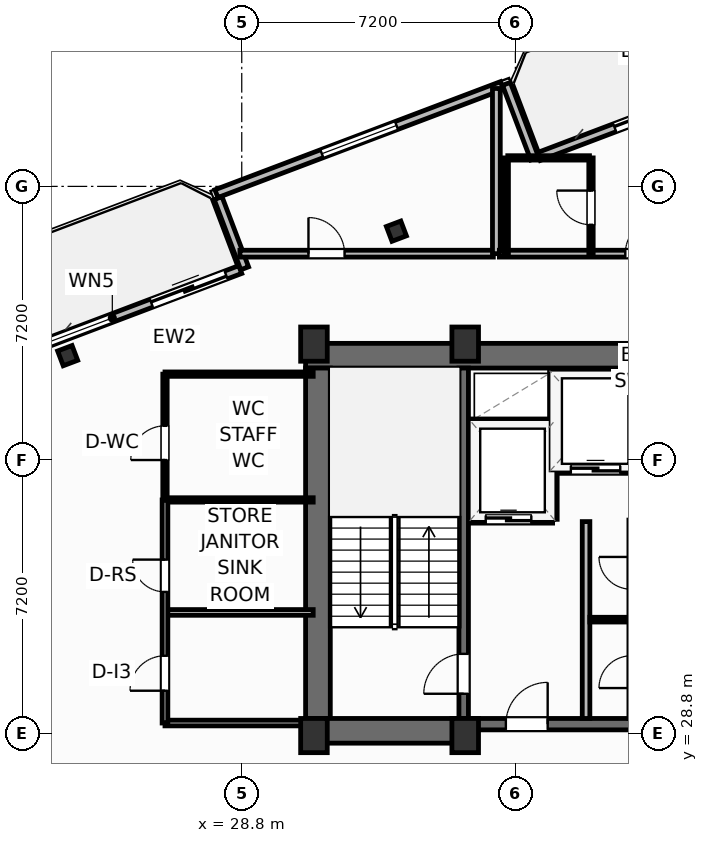
"""IFC4 building model, lengths in metres.
Left out: names, types, materials, properties, quantities, classifications, styles, units other than length and angle.
Written with IfcOpenShell. Run it as: python <this file> out.ifc"""

import sys

from ifc_helpers import new_model, si_unit, direction, frame, frame_2d, origin, origin_2d, place, context, subcontext, project, spatial, rectangle, i_section, extrude, element, fill, save


model = new_model("IFC4")
c1 = context("Model", 3, precision=1e-05, world=origin(), true_north=direction((0.0, 1.0)))
c2 = subcontext(c1, "Body", "Model", "MODEL_VIEW")
j1 = project(units=[si_unit("LENGTHUNIT", "METRE"), si_unit("PLANEANGLEUNIT", "RADIAN")], contexts=[c1])
p1 = place(None, origin())
s1 = spatial("IfcSite", under=j1, at=p1, CompositionType="ELEMENT")
p2 = place(p1, origin())
s2 = spatial("IfcBuilding", under=s1, at=p2, CompositionType="ELEMENT")
p3 = place(p2, frame((0.0, 0.0, 220.1)))
s3 = spatial("IfcBuildingStorey", under=s2, at=p3, CompositionType="ELEMENT", Elevation=220.1)
for number, where, z_axis, x_axis in (
    (1, (30.7, 28.75, 0.0), (0.0, 0.0, 1.0), (1.0, 0.0, 0.0)),
    (2, (34.68, 28.75, 0.0), (0.0, 0.0, 1.0), (1.0, 0.0, 0.0)),
    (3, (30.7, 39.05, 0.0), (0.0, 0.0, 1.0), (1.0, 0.0, 0.0)),
    (4, (34.68, 39.05, 0.0), (0.0, 0.0, 1.0), (1.0, 0.0, 0.0)),
):
    element("IfcColumn", number, at=place(p3, frame(where, z_axis=z_axis, x_axis=x_axis)), inside=s3, PredefinedType="COLUMN", context=c2, shape_type="SweptSolid", body=[
        extrude(rectangle(XDim=0.7, YDim=0.9, at=origin_2d()), origin(), (0.0, 0.0, 1.0), 3.7),
    ])
p4 = place(p3, frame((30.48, 38.745, 0.0), z_axis=(0.0, 0.0, 1.0), x_axis=(1.0, 0.0, 0.0)))
e5 = element("IfcWall", 5, at=p4, inside=s3, PredefinedType="SHEAR", context=c2, shape_type="SweptSolid", body=[
    extrude(rectangle(XDim=17.44, YDim=0.65, at=frame_2d((8.72, 0.0))), origin(), (0.0, 0.0, 1.0), 3.45),
])
p5 = place(p3, frame((30.805, 29.2, 0.0), z_axis=(0.0, 0.0, 1.0), x_axis=(0.0, 1.0, 0.0)))
e6 = element("IfcWall", 6, at=p5, inside=s3, PredefinedType="SHEAR", context=c2, shape_type="SweptSolid", body=[
    extrude(rectangle(XDim=9.22, YDim=0.65, at=frame_2d((4.61, 0.0))), origin(), (0.0, 0.0, 1.0), 3.45),
])
p6 = place(p3, frame((30.48, 28.875, 0.0), z_axis=(0.0, 0.0, 1.0), x_axis=(1.0, 0.0, 0.0)))
e7 = element("IfcWall", 7, at=p6, inside=s3, PredefinedType="SHEAR", context=c2, shape_type="SweptSolid", body=[
    extrude(rectangle(XDim=4.32, YDim=0.65, at=frame_2d((2.16, 0.0))), origin(), (0.0, 0.0, 1.0), 3.45),
])
p7 = place(p3, frame((34.8, 29.05, 0.0), z_axis=(0.0, 0.0, 1.0), x_axis=(1.0, 0.0, 0.0)))
e8 = element("IfcWall", 8, at=p7, inside=s3, PredefinedType="SHEAR", context=c2, shape_type="SweptSolid", body=[
    extrude(rectangle(XDim=8.8, YDim=0.3, at=frame_2d((4.4, 0.0))), origin(), (0.0, 0.0, 1.0), 3.45),
])
p8 = place(p7, frame((0.95, 0.0, 0.0)))
e9 = element("IfcOpeningElement", 9, at=p8, cuts=e8, PredefinedType="OPENING", context=c2, shape_type="SweptSolid", body=[
    extrude(rectangle(XDim=1.1, YDim=2.15, at=frame_2d((0.55, 1.075))), frame((0.0, 0.16, 0.0), z_axis=(0.0, -1.0, 0.0), x_axis=(1.0, 0.0, 0.0)), (0.0, 0.0, 1.0), 0.32),
])
p9 = place(p7, frame((6.75, 0.0, 0.0)))
e10 = element("IfcOpeningElement", 10, at=p9, cuts=e8, PredefinedType="OPENING", context=c2, shape_type="SweptSolid", body=[
    extrude(rectangle(XDim=1.1, YDim=2.15, at=frame_2d((0.55, 1.075))), frame((0.0, 0.16, 0.0), z_axis=(0.0, -1.0, 0.0), x_axis=(1.0, 0.0, 0.0)), (0.0, 0.0, 1.0), 0.32),
])
p10 = place(p7, frame((4.45, 0.0, 0.0)))
e11 = element("IfcOpeningElement", 11, at=p10, cuts=e8, PredefinedType="OPENING", context=c2, shape_type="SweptSolid", body=[
    extrude(rectangle(XDim=0.95, YDim=2.15, at=frame_2d((0.475, 1.075))), frame((0.0, 0.16, 0.0), z_axis=(0.0, -1.0, 0.0), x_axis=(1.0, 0.0, 0.0)), (0.0, 0.0, 1.0), 0.32),
])
p11 = place(p3, frame((34.64, 29.2, 0.0), z_axis=(0.0, 0.0, 1.0), x_axis=(0.0, 1.0, 0.0)))
e12 = element("IfcWall", 12, at=p11, inside=s3, PredefinedType="SHEAR", context=c2, shape_type="SweptSolid", body=[
    extrude(rectangle(XDim=9.22, YDim=0.25, at=frame_2d((4.61, 0.0))), origin(), (0.0, 0.0, 1.0), 3.45),
])
p12 = place(p11, frame((0.65, 0.0, 0.0)))
e13 = element("IfcOpeningElement", 13, at=p12, cuts=e12, PredefinedType="OPENING", context=c2, shape_type="SweptSolid", body=[
    extrude(rectangle(XDim=1.05, YDim=2.15, at=frame_2d((0.525, 1.075))), frame((0.0, 0.135, 0.0), z_axis=(0.0, -1.0, 0.0), x_axis=(1.0, 0.0, 0.0)), (0.0, 0.0, 1.0), 0.27),
])
for number, where, z_axis, x_axis in (
    (14, (32.869, 42.022, 0.0), (0.0, 0.0, 1.0), (0.935, 0.354, 0.0)),
    (15, (24.219, 38.747, 0.0), (0.0, 0.0, 1.0), (0.935, 0.354, 0.0)),
):
    element("IfcColumn", number, at=place(p3, frame(where, z_axis=z_axis, x_axis=x_axis)), inside=s3, PredefinedType="COLUMN", context=c2, shape_type="SweptSolid", body=[
        extrude(i_section(OverallWidth=0.406, OverallDepth=0.416, WebThickness=0.03, FlangeThickness=0.048, FilletRadius=0.025, at=origin_2d()), origin(), (0.0, 0.0, 1.0), 3.7),
    ])
p13 = place(p3, frame((23.149, 38.887, 0.0), z_axis=(0.0, 0.0, 1.0), x_axis=(0.9352192676, 0.354069091436, 0.0)))
e16 = element("IfcWall", 16, at=p13, inside=s3, PredefinedType="SOLIDWALL", context=c2, shape_type="SweptSolid", body=[
    extrude(rectangle(XDim=6.0, YDim=0.22, at=frame_2d((3.0, 0.0))), origin(), (0.0, 0.0, 1.0), 2.73),
])
p14 = place(p13, frame((3.5, 0.0, 0.0)))
e17 = element("IfcOpeningElement", 17, at=p14, cuts=e16, PredefinedType="OPENING", context=c2, shape_type="SweptSolid", body=[
    extrude(rectangle(XDim=2.1, YDim=2.3, at=frame_2d((1.05, 1.15))), frame((0.0, 0.12, 0.0), z_axis=(0.0, -1.0, 0.0), x_axis=(1.0, 0.0, 0.0)), (0.0, 0.0, 1.0), 0.24),
])
p15 = place(p13, frame((0.55, 0.0, 0.75)))
e18 = element("IfcOpeningElement", 18, at=p15, cuts=e16, PredefinedType="OPENING", context=c2, shape_type="SweptSolid", body=[
    extrude(rectangle(XDim=1.85, YDim=1.75, at=frame_2d((0.925, 0.875))), frame((0.0, 0.12, 0.0), z_axis=(0.0, -1.0, 0.0), x_axis=(1.0, 0.0, 0.0)), (0.0, 0.0, 1.0), 0.24),
])
p16 = place(p3, frame((36.617, 43.986, 0.0), z_axis=(0.0, 0.0, 1.0), x_axis=(0.935227640088, 0.354046976001, 0.0)))
e19 = element("IfcWall", 19, at=p16, inside=s3, PredefinedType="SOLIDWALL", context=c2, shape_type="SweptSolid", body=[
    extrude(rectangle(XDim=6.0, YDim=0.22, at=frame_2d((3.0, 0.0))), origin(), (0.0, 0.0, 1.0), 2.73),
])
p17 = place(p16, frame((2.136, 0.0, 0.0)))
e20 = element("IfcOpeningElement", 20, at=p17, cuts=e19, PredefinedType="OPENING", context=c2, shape_type="SweptSolid", body=[
    extrude(rectangle(XDim=2.1, YDim=2.3, at=frame_2d((1.05, 1.15))), frame((0.0, 0.12, 0.0), z_axis=(0.0, -1.0, 0.0), x_axis=(1.0, 0.0, 0.0)), (0.0, 0.0, 1.0), 0.24),
])
p18 = place(p3, frame((36.508, 43.934, 0.0), z_axis=(0.0, 0.0, 1.0), x_axis=(-0.354128469405, 0.935196785258, 0.0)))
e21 = element("IfcWall", 21, at=p18, inside=s3, PredefinedType="SOLIDWALL", context=c2, shape_type="SweptSolid", body=[
    extrude(rectangle(XDim=2.1, YDim=0.22, at=frame_2d((1.05, 0.0))), origin(), (0.0, 0.0, 1.0), 2.73),
])
p19 = place(p3, frame((35.648, 45.854, 0.0), z_axis=(0.0, 0.0, 1.0), x_axis=(-0.935230796934, -0.354038636968, 0.0)))
e22 = element("IfcWall", 22, at=p19, inside=s3, PredefinedType="SOLIDWALL", context=c2, shape_type="SweptSolid", body=[
    extrude(rectangle(XDim=8.035, YDim=0.22, at=frame_2d((4.018, 0.0))), origin(), (0.0, 0.0, 1.0), 2.73),
])
p20 = place(p19, frame((2.968, 0.0, 0.8)))
e23 = element("IfcOpeningElement", 23, at=p20, cuts=e22, PredefinedType="OPENING", context=c2, shape_type="SweptSolid", body=[
    extrude(rectangle(XDim=2.1, YDim=1.75, at=frame_2d((1.05, 0.875))), frame((0.0, 0.12, 0.0), z_axis=(0.0, -1.0, 0.0), x_axis=(1.0, 0.0, 0.0)), (0.0, 0.0, 1.0), 0.24),
])
p21 = place(p3, frame((28.177, 42.892, 0.0), z_axis=(0.0, 0.0, 1.0), x_axis=(0.354061611705, -0.935222099352, 0.0)))
e24 = element("IfcWall", 24, at=p21, inside=s3, PredefinedType="SOLIDWALL", context=c2, shape_type="SweptSolid", body=[
    extrude(rectangle(XDim=1.975, YDim=0.22, at=frame_2d((0.987, 0.0))), origin(), (0.0, 0.0, 1.0), 2.73),
])
p22 = place(p3, frame((28.752, 41.43, 0.0), z_axis=(0.0, 0.0, 1.0), x_axis=(1.0, 0.0, 0.0)))
e25 = element("IfcWall", 25, at=p22, inside=s3, PredefinedType="PARTITIONING", context=c2, shape_type="SweptSolid", body=[
    extrude(rectangle(XDim=6.668, YDim=0.18, at=frame_2d((3.334, 0.0))), origin(), (0.0, 0.0, 1.0), 3.45),
])
p23 = place(p22, frame((1.803, 0.0, 0.0)))
e26 = element("IfcOpeningElement", 26, at=p23, cuts=e25, PredefinedType="OPENING", context=c2, shape_type="SweptSolid", body=[
    extrude(rectangle(XDim=0.95, YDim=2.05, at=frame_2d((0.475, 1.025))), frame((0.0, 0.1, 0.0), z_axis=(0.0, -1.0, 0.0), x_axis=(1.0, 0.0, 0.0)), (0.0, 0.0, 1.0), 0.2),
])
p24 = place(p3, frame((35.5, 41.43, 0.0), z_axis=(0.0, 0.0, 1.0), x_axis=(0.0, 1.0, 0.0)))
e27 = element("IfcWall", 27, at=p24, inside=s3, PredefinedType="PARTITIONING", context=c2, shape_type="SweptSolid", body=[
    extrude(rectangle(XDim=4.346, YDim=0.205, at=frame_2d((2.173, 0.0))), origin(), (0.0, 0.0, 1.0), 3.45),
])
p25 = place(p3, frame((35.58, 41.43, 0.0), z_axis=(0.0, 0.0, 1.0), x_axis=(1.0, 0.0, 0.0)))
e28 = element("IfcWall", 28, at=p25, inside=s3, PredefinedType="PARTITIONING", context=c2, shape_type="SweptSolid", body=[
    extrude(rectangle(XDim=11.34, YDim=0.18, at=frame_2d((5.67, 0.0))), origin(), (0.0, 0.0, 1.0), 3.018),
])
p26 = place(p25, frame((3.313, 0.0, 0.0)))
e29 = element("IfcOpeningElement", 29, at=p26, cuts=e28, PredefinedType="OPENING", context=c2, shape_type="SweptSolid", body=[
    extrude(rectangle(XDim=0.95, YDim=2.15, at=frame_2d((0.475, 1.075))), frame((0.0, 0.1, 0.0), z_axis=(0.0, -1.0, 0.0), x_axis=(1.0, 0.0, 0.0)), (0.0, 0.0, 1.0), 0.2),
])
p27 = place(p3, frame((35.8, 43.95, 0.0), z_axis=(0.0, 0.0, 1.0), x_axis=(1.0, 0.0, 0.0)))
e30 = element("IfcWall", 30, at=p27, inside=s3, PredefinedType="PARTITIONING", context=c2, shape_type="SweptSolid", body=[
    extrude(rectangle(XDim=2.15, YDim=0.115, at=frame_2d((1.075, 0.0))), origin(), (0.0, 0.0, 1.0), 3.45),
])
p28 = place(p3, frame((37.99, 41.43, 0.0), z_axis=(0.0, 0.0, 1.0), x_axis=(0.0, 1.0, 0.0)))
e31 = element("IfcWall", 31, at=p28, inside=s3, PredefinedType="PARTITIONING", context=c2, shape_type="SweptSolid", body=[
    extrude(rectangle(XDim=2.52, YDim=0.115, at=frame_2d((1.26, 0.0))), origin(), (0.0, 0.0, 1.0), 3.45),
])
p29 = place(p28, frame((0.76, 0.0, 0.0)))
e32 = element("IfcOpeningElement", 32, at=p29, cuts=e31, PredefinedType="OPENING", context=c2, shape_type="SweptSolid", body=[
    extrude(rectangle(XDim=0.9, YDim=2.05, at=frame_2d((0.45, 1.025))), frame((0.0, 0.067, 0.0), z_axis=(0.0, -1.0, 0.0), x_axis=(1.0, 0.0, 0.0)), (0.0, 0.0, 1.0), 0.135),
])
p30 = place(p3, frame((35.76, 41.43, 0.0), z_axis=(0.0, 0.0, 1.0), x_axis=(0.0, 1.0, 0.0)))
e33 = element("IfcWall", 33, at=p30, inside=s3, PredefinedType="PARTITIONING", context=c2, shape_type="SweptSolid", body=[
    extrude(rectangle(XDim=2.52, YDim=0.115, at=frame_2d((1.26, 0.0))), origin(), (0.0, 0.0, 1.0), 3.45),
])
p31 = place(p3, frame((37.86, 29.2, 0.0), z_axis=(0.0, 0.0, 1.0), x_axis=(0.0, 1.0, 0.0)))
e34 = element("IfcWall", 34, at=p31, inside=s3, PredefinedType="PARTITIONING", context=c2, shape_type="SweptSolid", body=[
    extrude(rectangle(XDim=5.18, YDim=0.2, at=frame_2d((2.59, 0.0))), origin(), (0.0, 0.0, 1.0), 3.45),
])
p32 = place(p3, frame((34.8, 34.44, 0.0), z_axis=(0.0, 0.0, 1.0), x_axis=(1.0, 0.0, 0.0)))
e35 = element("IfcWall", 35, at=p32, inside=s3, PredefinedType="PARTITIONING", context=c2, shape_type="SweptSolid", body=[
    extrude(rectangle(XDim=2.18, YDim=0.2, at=frame_2d((1.09, 0.0))), origin(), (0.0, 0.0, 1.0), 3.45),
])
p33 = place(p32, frame((0.42, 0.0, 0.0)))
e36 = element("IfcOpeningElement", 36, at=p33, cuts=e35, PredefinedType="OPENING", context=c2, shape_type="SweptSolid", body=[
    extrude(rectangle(XDim=1.2, YDim=2.2, at=frame_2d((0.6, 1.1))), frame((0.0, 0.11, 0.0), z_axis=(0.0, -1.0, 0.0), x_axis=(1.0, 0.0, 0.0)), (0.0, 0.0, 1.0), 0.22),
])
p34 = place(p3, frame((34.8, 36.98, 0.0), z_axis=(0.0, 0.0, 1.0), x_axis=(1.0, 0.0, 0.0)))
e37 = element("IfcWall", 37, at=p34, inside=s3, PredefinedType="PARTITIONING", context=c2, shape_type="SweptSolid", body=[
    extrude(rectangle(XDim=2.18, YDim=0.2, at=frame_2d((1.09, 0.0))), origin(), (0.0, 0.0, 1.0), 3.45),
])
p35 = place(p3, frame((37.0, 34.44, 0.0), z_axis=(0.0, 0.0, 1.0), x_axis=(0.0, 1.0, 0.0)))
e38 = element("IfcWall", 38, at=p35, inside=s3, PredefinedType="PARTITIONING", context=c2, shape_type="SweptSolid", body=[
    extrude(rectangle(XDim=3.9, YDim=0.2, at=frame_2d((1.95, 0.0))), origin(), (0.0, 0.0, 1.0), 3.45),
])
p36 = place(p3, frame((37.06, 35.75, 0.0), z_axis=(0.0, 0.0, 1.0), x_axis=(1.0, 0.0, 0.0)))
e39 = element("IfcWall", 39, at=p36, inside=s3, PredefinedType="PARTITIONING", context=c2, shape_type="SweptSolid", body=[
    extrude(rectangle(XDim=2.12, YDim=0.2, at=frame_2d((1.06, 0.0))), origin(), (0.0, 0.0, 1.0), 3.45),
])
p37 = place(p36, frame((0.4, 0.0, 0.0)))
e40 = element("IfcOpeningElement", 40, at=p37, cuts=e39, PredefinedType="OPENING", context=c2, shape_type="SweptSolid", body=[
    extrude(rectangle(XDim=1.3, YDim=2.2, at=frame_2d((0.65, 1.1))), frame((0.0, 0.11, 0.0), z_axis=(0.0, -1.0, 0.0), x_axis=(1.0, 0.0, 0.0)), (0.0, 0.0, 1.0), 0.22),
])
p38 = place(p3, frame((37.96, 31.8, 0.0), z_axis=(0.0, 0.0, 1.0), x_axis=(1.0, 0.0, 0.0)))
e41 = element("IfcWall", 41, at=p38, inside=s3, PredefinedType="PARTITIONING", context=c2, shape_type="SweptSolid", body=[
    extrude(rectangle(XDim=1.09, YDim=0.125, at=frame_2d((0.545, 0.0))), origin(), (0.0, 0.0, 1.0), 3.45),
])
p39 = place(p3, frame((26.78, 29.08, 0.0), z_axis=(0.0, 0.0, 1.0), x_axis=(1.0, 0.0, 0.0)))
e42 = element("IfcWall", 42, at=p39, inside=s3, PredefinedType="PARTITIONING", context=c2, shape_type="SweptSolid", body=[
    extrude(rectangle(XDim=3.7, YDim=0.15, at=frame_2d((1.85, 0.0))), origin(), (0.0, 0.0, 1.0), 3.45),
])
p40 = place(p3, frame((26.8, 31.99, 0.0), z_axis=(0.0, 0.0, 1.0), x_axis=(1.0, 0.0, 0.0)))
e43 = element("IfcWall", 43, at=p40, inside=s3, PredefinedType="PARTITIONING", context=c2, shape_type="SweptSolid", body=[
    extrude(rectangle(XDim=3.88, YDim=0.15, at=frame_2d((1.94, 0.0))), origin(), (0.0, 0.0, 1.0), 3.45),
])
p41 = place(p3, frame((26.8, 34.95, 0.0), z_axis=(0.0, 0.0, 1.0), x_axis=(1.0, 0.0, 0.0)))
e44 = element("IfcWall", 44, at=p41, inside=s3, PredefinedType="PARTITIONING", context=c2, shape_type="SweptSolid", body=[
    extrude(rectangle(XDim=3.88, YDim=0.115, at=frame_2d((1.94, 0.0))), origin(), (0.0, 0.0, 1.0), 3.45),
])
p42 = place(p3, frame((26.78, 38.26, 0.0), z_axis=(0.0, 0.0, 1.0), x_axis=(1.0, 0.0, 0.0)))
e45 = element("IfcWall", 45, at=p42, inside=s3, PredefinedType="PARTITIONING", context=c2, shape_type="SweptSolid", body=[
    extrude(rectangle(XDim=3.9, YDim=0.115, at=frame_2d((1.95, 0.0))), origin(), (0.0, 0.0, 1.0), 3.45),
])
p43 = place(p3, frame((26.78, 29.08, 0.0), z_axis=(0.0, 0.0, 1.0), x_axis=(0.0, 1.0, 0.0)))
e46 = element("IfcWall", 46, at=p43, inside=s3, PredefinedType="PARTITIONING", context=c2, shape_type="SweptSolid", body=[
    extrude(rectangle(XDim=5.87, YDim=0.15, at=frame_2d((2.935, 0.0))), origin(), (0.0, 0.0, 1.0), 3.45),
])
p44 = place(p43, frame((0.85, 0.0, 0.0)))
e47 = element("IfcOpeningElement", 47, at=p44, cuts=e46, PredefinedType="OPENING", context=c2, shape_type="SweptSolid", body=[
    extrude(rectangle(XDim=0.92, YDim=2.05, at=frame_2d((0.46, 1.025))), frame((0.0, 0.085, 0.0), z_axis=(0.0, -1.0, 0.0), x_axis=(1.0, 0.0, 0.0)), (0.0, 0.0, 1.0), 0.17),
])
p45 = place(p43, frame((3.45, 0.0, 0.0)))
e48 = element("IfcOpeningElement", 48, at=p45, cuts=e46, PredefinedType="OPENING", context=c2, shape_type="SweptSolid", body=[
    extrude(rectangle(XDim=0.85, YDim=2.05, at=frame_2d((0.425, 1.025))), frame((0.0, 0.085, 0.0), z_axis=(0.0, -1.0, 0.0), x_axis=(1.0, 0.0, 0.0)), (0.0, 0.0, 1.0), 0.17),
])
p46 = place(p3, frame((26.78, 34.95, 0.0), z_axis=(0.0, 0.0, 1.0), x_axis=(0.0, 1.0, 0.0)))
e49 = element("IfcWall", 49, at=p46, inside=s3, PredefinedType="PARTITIONING", context=c2, shape_type="SweptSolid", body=[
    extrude(rectangle(XDim=3.31, YDim=0.115, at=frame_2d((1.655, 0.0))), origin(), (0.0, 0.0, 1.0), 3.45),
])
p47 = place(p46, frame((1.05, 0.0, 0.0)))
e50 = element("IfcOpeningElement", 50, at=p47, cuts=e49, PredefinedType="OPENING", context=c2, shape_type="SweptSolid", body=[
    extrude(rectangle(XDim=0.9, YDim=2.05, at=frame_2d((0.45, 1.025))), frame((0.0, 0.067, 0.0), z_axis=(0.0, -1.0, 0.0), x_axis=(1.0, 0.0, 0.0)), (0.0, 0.0, 1.0), 0.135),
])
p48 = place(p14, origin())
e51 = element("IfcDoor", 51, at=p48, inside=s3, OperationType="SLIDING_TO_LEFT", PredefinedType="DOOR", context=c2, shape_type="SweptSolid", body=[
    extrude(rectangle(XDim=2.1, YDim=2.3, at=frame_2d((1.05, 1.15))), frame((0.0, 0.025, 0.0), z_axis=(0.0, -1.0, 0.0), x_axis=(1.0, 0.0, 0.0)), (0.0, 0.0, 1.0), 0.05),
])
fill(e17, e51)
p49 = place(p15, origin())
e52 = element("IfcWindow", 52, at=p49, inside=s3, PartitioningType="SINGLE_PANEL", PredefinedType="WINDOW", context=c2, shape_type="SweptSolid", body=[
    extrude(rectangle(XDim=1.85, YDim=1.75, at=frame_2d((0.925, 0.875))), frame((0.0, 0.03, 0.0), z_axis=(0.0, -1.0, 0.0), x_axis=(1.0, 0.0, 0.0)), (0.0, 0.0, 1.0), 0.06),
])
fill(e18, e52)
p50 = place(p17, origin())
e53 = element("IfcDoor", 53, at=p50, inside=s3, OperationType="SLIDING_TO_LEFT", PredefinedType="DOOR", context=c2, shape_type="SweptSolid", body=[
    extrude(rectangle(XDim=2.1, YDim=2.3, at=frame_2d((1.05, 1.15))), frame((0.0, 0.025, 0.0), z_axis=(0.0, -1.0, 0.0), x_axis=(1.0, 0.0, 0.0)), (0.0, 0.0, 1.0), 0.05),
])
fill(e20, e53)
p51 = place(p20, origin())
e54 = element("IfcWindow", 54, at=p51, inside=s3, PartitioningType="SINGLE_PANEL", PredefinedType="WINDOW", context=c2, shape_type="SweptSolid", body=[
    extrude(rectangle(XDim=2.1, YDim=1.75, at=frame_2d((1.05, 0.875))), frame((0.0, 0.03, 0.0), z_axis=(0.0, -1.0, 0.0), x_axis=(1.0, 0.0, 0.0)), (0.0, 0.0, 1.0), 0.06),
])
fill(e23, e54)
p52 = place(p23, origin())
e55 = element("IfcDoor", 55, at=p52, inside=s3, OperationType="SINGLE_SWING_LEFT", PredefinedType="DOOR", context=c2, shape_type="SweptSolid", body=[
    extrude(rectangle(XDim=0.95, YDim=2.05, at=frame_2d((0.475, 1.025))), frame((0.0, 0.025, 0.0), z_axis=(0.0, -1.0, 0.0), x_axis=(1.0, 0.0, 0.0)), (0.0, 0.0, 1.0), 0.05),
])
fill(e26, e55)
p53 = place(p26, origin())
e56 = element("IfcDoor", 56, at=p53, inside=s3, OperationType="SINGLE_SWING_RIGHT", PredefinedType="DOOR", context=c2, shape_type="SweptSolid", body=[
    extrude(rectangle(XDim=0.95, YDim=2.15, at=frame_2d((0.475, 1.075))), frame((0.0, 0.025, 0.0), z_axis=(0.0, -1.0, 0.0), x_axis=(1.0, 0.0, 0.0)), (0.0, 0.0, 1.0), 0.05),
])
fill(e29, e56)
p54 = place(p29, origin())
e57 = element("IfcDoor", 57, at=p54, inside=s3, OperationType="SINGLE_SWING_RIGHT", PredefinedType="DOOR", context=c2, shape_type="SweptSolid", body=[
    extrude(rectangle(XDim=0.9, YDim=2.05, at=frame_2d((0.45, 1.025))), frame((0.0, 0.025, 0.0), z_axis=(0.0, -1.0, 0.0), x_axis=(1.0, 0.0, 0.0)), (0.0, 0.0, 1.0), 0.05),
])
fill(e32, e57)
p55 = place(p12, origin())
e58 = element("IfcDoor", 58, at=p55, inside=s3, OperationType="SINGLE_SWING_LEFT", PredefinedType="DOOR", context=c2, shape_type="SweptSolid", body=[
    extrude(rectangle(XDim=1.05, YDim=2.15, at=frame_2d((0.525, 1.075))), frame((0.0, 0.025, 0.0), z_axis=(0.0, -1.0, 0.0), x_axis=(1.0, 0.0, 0.0)), (0.0, 0.0, 1.0), 0.05),
])
fill(e13, e58)
p56 = place(p8, origin())
e59 = element("IfcDoor", 59, at=p56, inside=s3, OperationType="SINGLE_SWING_RIGHT", PredefinedType="DOOR", context=c2, shape_type="SweptSolid", body=[
    extrude(rectangle(XDim=1.1, YDim=2.15, at=frame_2d((0.55, 1.075))), frame((0.0, 0.025, 0.0), z_axis=(0.0, -1.0, 0.0), x_axis=(1.0, 0.0, 0.0)), (0.0, 0.0, 1.0), 0.05),
])
fill(e9, e59)
p57 = place(p33, origin())
e60 = element("IfcDoor", 60, at=p57, inside=s3, OperationType="SLIDING_TO_LEFT", PredefinedType="DOOR", context=c2, shape_type="SweptSolid", body=[
    extrude(rectangle(XDim=1.2, YDim=2.2, at=frame_2d((0.6, 1.1))), frame((0.0, 0.025, 0.0), z_axis=(0.0, -1.0, 0.0), x_axis=(1.0, 0.0, 0.0)), (0.0, 0.0, 1.0), 0.05),
])
fill(e36, e60)
p58 = place(p37, origin())
e61 = element("IfcDoor", 61, at=p58, inside=s3, OperationType="SLIDING_TO_LEFT", PredefinedType="DOOR", context=c2, shape_type="SweptSolid", body=[
    extrude(rectangle(XDim=1.3, YDim=2.2, at=frame_2d((0.65, 1.1))), frame((0.0, 0.025, 0.0), z_axis=(0.0, -1.0, 0.0), x_axis=(1.0, 0.0, 0.0)), (0.0, 0.0, 1.0), 0.05),
])
fill(e40, e61)
p59 = place(p44, origin())
e62 = element("IfcDoor", 62, at=p59, inside=s3, OperationType="SINGLE_SWING_LEFT", PredefinedType="DOOR", context=c2, shape_type="SweptSolid", body=[
    extrude(rectangle(XDim=0.92, YDim=2.05, at=frame_2d((0.46, 1.025))), frame((0.0, 0.025, 0.0), z_axis=(0.0, -1.0, 0.0), x_axis=(1.0, 0.0, 0.0)), (0.0, 0.0, 1.0), 0.05),
])
fill(e47, e62)
p60 = place(p45, origin())
e63 = element("IfcDoor", 63, at=p60, inside=s3, OperationType="SINGLE_SWING_RIGHT", PredefinedType="DOOR", context=c2, shape_type="SweptSolid", body=[
    extrude(rectangle(XDim=0.85, YDim=2.05, at=frame_2d((0.425, 1.025))), frame((0.0, 0.025, 0.0), z_axis=(0.0, -1.0, 0.0), x_axis=(1.0, 0.0, 0.0)), (0.0, 0.0, 1.0), 0.05),
])
fill(e48, e63)
p61 = place(p47, origin())
e64 = element("IfcDoor", 64, at=p61, inside=s3, OperationType="SINGLE_SWING_LEFT", PredefinedType="DOOR", context=c2, shape_type="SweptSolid", body=[
    extrude(rectangle(XDim=0.9, YDim=2.05, at=frame_2d((0.45, 1.025))), frame((0.0, 0.025, 0.0), z_axis=(0.0, -1.0, 0.0), x_axis=(1.0, 0.0, 0.0)), (0.0, 0.0, 1.0), 0.05),
])
fill(e50, e64)
save(model, sys.argv[1])
